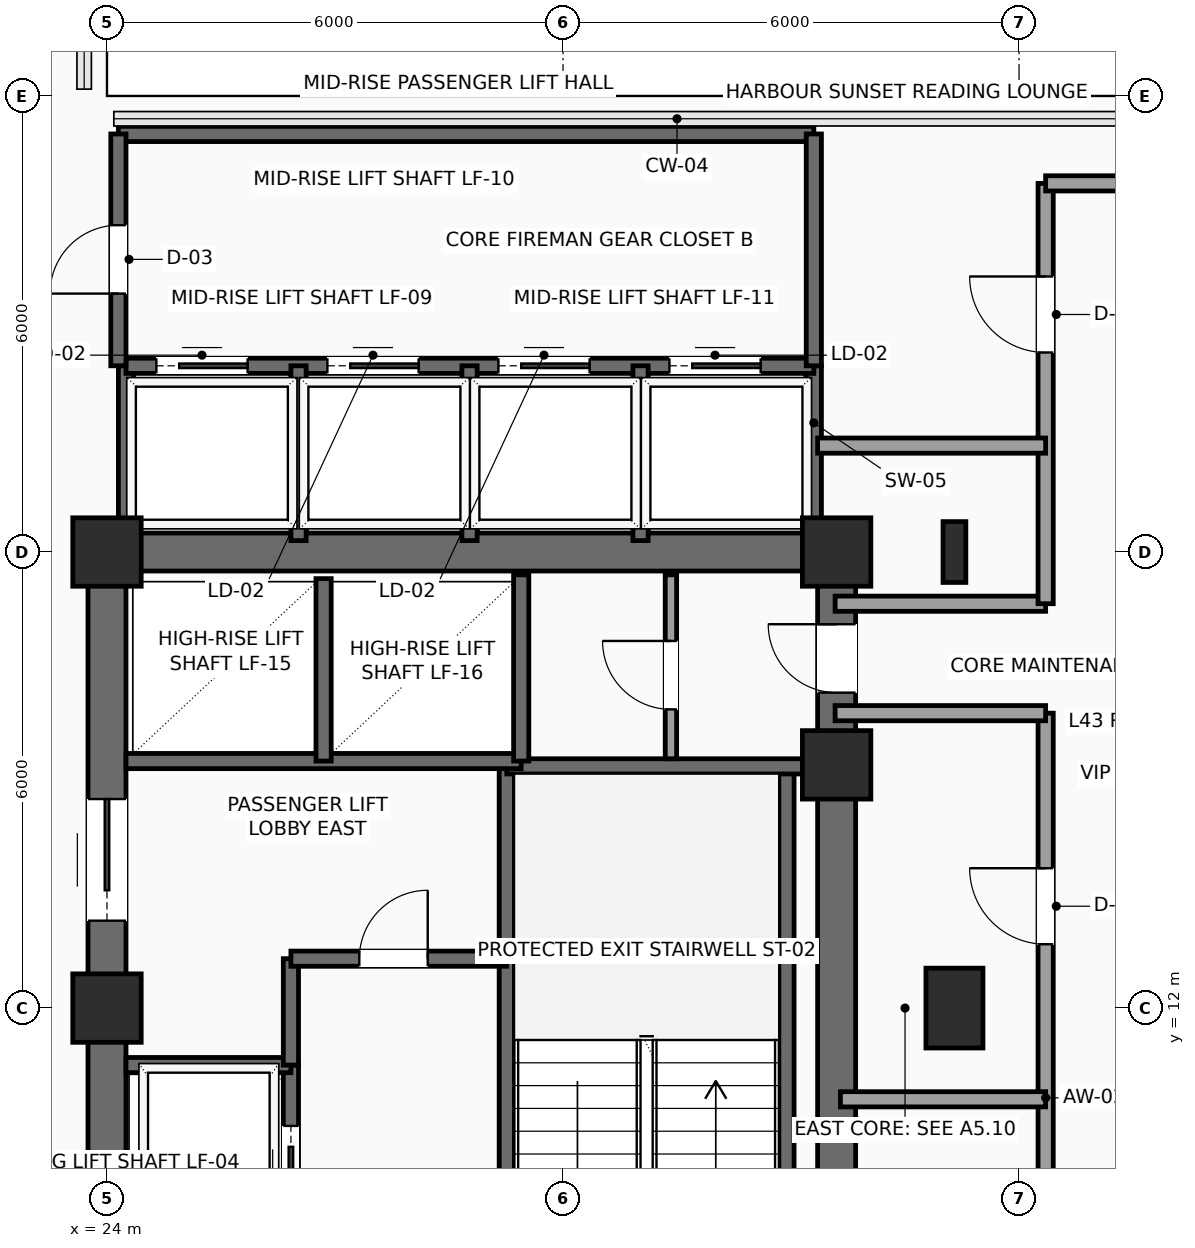
"""IFC4 building model, lengths in metres.
Left out: names, types, materials, properties, quantities, classifications, styles, units other than length and angle.
Written with IfcOpenShell. Run it as: python <this file> out.ifc"""

import sys

from ifc_helpers import new_model, si_unit, direction, frame, frame_2d, origin, origin_2d, place, context, subcontext, project, spatial, rectangle, i_section, extrude, element, fill, save


model = new_model("IFC4")
c1 = context("Model", 3, precision=1e-05, world=origin(), true_north=direction((0.0, 1.0)))
c2 = subcontext(c1, "Body", "Model", "MODEL_VIEW")
j1 = project(units=[si_unit("LENGTHUNIT", "METRE"), si_unit("PLANEANGLEUNIT", "RADIAN")], contexts=[c1])
p1 = place(None, origin())
s1 = spatial("IfcSite", under=j1, at=p1, CompositionType="ELEMENT")
p2 = place(p1, origin())
s2 = spatial("IfcBuilding", under=s1, at=p2, CompositionType="ELEMENT")
p3 = place(p2, frame((0.0, 0.0, 176.7)))
s3 = spatial("IfcBuildingStorey", under=s2, at=p3, CompositionType="ELEMENT", Elevation=176.7)
for number, where, z_axis, x_axis in (
    (1, (24.0, 12.0, 0.0), (0.0, 0.0, 1.0), (1.0, 0.0, 0.0)),
    (2, (24.0, 18.0, 0.0), (0.0, 0.0, 1.0), (1.0, 0.0, 0.0)),
    (3, (33.6, 15.2, 0.0), (0.0, 0.0, 1.0), (1.0, 0.0, 0.0)),
    (4, (33.6, 18.0, 0.0), (0.0, 0.0, 1.0), (1.0, 0.0, 0.0)),
):
    element("IfcColumn", number, at=place(p3, frame(where, z_axis=z_axis, x_axis=x_axis)), inside=s3, PredefinedType="COLUMN", context=c2, shape_type="SweptSolid", body=[
        extrude(rectangle(XDim=0.9, YDim=0.9, at=origin_2d()), origin(), (0.0, 0.0, 1.0), 3.75),
    ])
p4 = place(p3, frame((35.15, 12.0, 0.0), z_axis=(0.0, 0.0, 1.0), x_axis=(1.0, 0.0, 0.0)))
e5 = element("IfcColumn", 5, at=p4, inside=s3, PredefinedType="COLUMN", context=c2, shape_type="SweptSolid", body=[
    extrude(rectangle(XDim=0.75, YDim=1.05, at=origin_2d()), origin(), (0.0, 0.0, 1.0), 3.75),
])
p5 = place(p3, frame((35.15, 18.0, 0.0), z_axis=(0.0, 0.0, 1.0), x_axis=(1.0, 0.0, 0.0)))
e6 = element("IfcColumn", 6, at=p5, inside=s3, PredefinedType="COLUMN", context=c2, shape_type="SweptSolid", body=[
    extrude(i_section(OverallWidth=0.3, OverallDepth=0.8, WebThickness=0.018, FlangeThickness=0.033, FilletRadius=0.03, at=origin_2d()), origin(), (0.0, 0.0, 1.0), 3.75),
])
p6 = place(p3, frame((24.0, 18.0, 0.0), z_axis=(0.0, 0.0, 1.0), x_axis=(1.0, 0.0, 0.0)))
e7 = element("IfcWall", 7, at=p6, inside=s3, PredefinedType="SHEAR", context=c2, shape_type="SweptSolid", body=[
    extrude(rectangle(XDim=9.6, YDim=0.5, at=frame_2d((4.8, 0.0))), origin(), (0.0, 0.0, 1.0), 3.54),
])
p7 = place(p3, frame((24.0, 6.0, 0.0), z_axis=(0.0, 0.0, 1.0), x_axis=(0.0, 1.0, 0.0)))
e8 = element("IfcWall", 8, at=p7, inside=s3, PredefinedType="SHEAR", context=c2, shape_type="SweptSolid", body=[
    extrude(rectangle(XDim=12.0, YDim=0.5, at=frame_2d((6.0, 0.0))), origin(), (0.0, 0.0, 1.0), 3.54),
])
p8 = place(p7, frame((7.15, 0.0, 0.0)))
e9 = element("IfcOpeningElement", 9, at=p8, cuts=e8, PredefinedType="OPENING", context=c2, shape_type="SweptSolid", body=[
    extrude(rectangle(XDim=1.6, YDim=2.3, at=frame_2d((0.8, 1.15))), frame((0.0, 0.26, 0.0), z_axis=(0.0, -1.0, 0.0), x_axis=(1.0, 0.0, 0.0)), (0.0, 0.0, 1.0), 0.52),
])
p9 = place(p3, frame((33.6, 6.0, 0.0), z_axis=(0.0, 0.0, 1.0), x_axis=(0.0, 1.0, 0.0)))
e10 = element("IfcWall", 10, at=p9, inside=s3, PredefinedType="SHEAR", context=c2, shape_type="SweptSolid", body=[
    extrude(rectangle(XDim=12.0, YDim=0.5, at=frame_2d((6.0, 0.0))), origin(), (0.0, 0.0, 1.0), 3.54),
])
p10 = place(p9, frame((10.15, 0.0, 0.0)))
e11 = element("IfcOpeningElement", 11, at=p10, cuts=e10, PredefinedType="OPENING", context=c2, shape_type="SweptSolid", body=[
    extrude(rectangle(XDim=0.9, YDim=2.15, at=frame_2d((0.45, 1.075))), frame((0.0, 0.26, 0.0), z_axis=(0.0, -1.0, 0.0), x_axis=(1.0, 0.0, 0.0)), (0.0, 0.0, 1.0), 0.52),
])
p11 = place(p3, frame((29.26, 6.3, 0.0), z_axis=(0.0, 0.0, 1.0), x_axis=(0.0, 1.0, 0.0)))
e12 = element("IfcWall", 12, at=p11, inside=s3, PredefinedType="SHEAR", context=c2, shape_type="SweptSolid", body=[
    extrude(rectangle(XDim=8.88, YDim=0.2, at=frame_2d((4.44, 0.0))), origin(), (0.0, 0.0, 1.0), 3.54),
])
p12 = place(p11, frame((0.35, 0.0, 0.0)))
e13 = element("IfcOpeningElement", 13, at=p12, cuts=e12, PredefinedType="OPENING", context=c2, shape_type="SweptSolid", body=[
    extrude(rectangle(XDim=1.1, YDim=2.2, at=frame_2d((0.55, 1.1))), frame((0.0, 0.11, 0.0), z_axis=(0.0, -1.0, 0.0), x_axis=(1.0, 0.0, 0.0)), (0.0, 0.0, 1.0), 0.22),
])
p13 = place(p3, frame((32.94, 6.3, 0.0), z_axis=(0.0, 0.0, 1.0), x_axis=(0.0, 1.0, 0.0)))
e14 = element("IfcWall", 14, at=p13, inside=s3, PredefinedType="SHEAR", context=c2, shape_type="SweptSolid", body=[
    extrude(rectangle(XDim=8.88, YDim=0.2, at=frame_2d((4.44, 0.0))), origin(), (0.0, 0.0, 1.0), 3.54),
])
p14 = place(p3, frame((29.26, 15.18, 0.0), z_axis=(0.0, 0.0, 1.0), x_axis=(1.0, 0.0, 0.0)))
e15 = element("IfcWall", 15, at=p14, inside=s3, PredefinedType="SHEAR", context=c2, shape_type="SweptSolid", body=[
    extrude(rectangle(XDim=4.04, YDim=0.2, at=frame_2d((2.02, 0.0))), origin(), (0.0, 0.0, 1.0), 3.54),
])
p15 = place(p3, frame((26.42, 6.3, 0.0), z_axis=(0.0, 0.0, 1.0), x_axis=(0.0, 1.0, 0.0)))
e16 = element("IfcWall", 16, at=p15, inside=s3, PredefinedType="SHEAR", context=c2, shape_type="SweptSolid", body=[
    extrude(rectangle(XDim=4.95, YDim=0.2, at=frame_2d((2.475, 0.0))), origin(), (0.0, 0.0, 1.0), 3.54),
])
p16 = place(p15, frame((0.65, 0.0, 0.0)))
e17 = element("IfcOpeningElement", 17, at=p16, cuts=e16, PredefinedType="OPENING", context=c2, shape_type="SweptSolid", body=[
    extrude(rectangle(XDim=1.1, YDim=2.2, at=frame_2d((0.55, 1.1))), frame((0.0, 0.11, 0.0), z_axis=(0.0, -1.0, 0.0), x_axis=(1.0, 0.0, 0.0)), (0.0, 0.0, 1.0), 0.22),
])
p17 = place(p15, frame((3.05, 0.0, 0.0)))
e18 = element("IfcOpeningElement", 18, at=p17, cuts=e16, PredefinedType="OPENING", context=c2, shape_type="SweptSolid", body=[
    extrude(rectangle(XDim=1.1, YDim=2.2, at=frame_2d((0.55, 1.1))), frame((0.0, 0.11, 0.0), z_axis=(0.0, -1.0, 0.0), x_axis=(1.0, 0.0, 0.0)), (0.0, 0.0, 1.0), 0.22),
])
p18 = place(p3, frame((24.25, 11.25, 0.0), z_axis=(0.0, 0.0, 1.0), x_axis=(1.0, 0.0, 0.0)))
e19 = element("IfcWall", 19, at=p18, inside=s3, PredefinedType="SHEAR", context=c2, shape_type="SweptSolid", body=[
    extrude(rectangle(XDim=2.17, YDim=0.2, at=frame_2d((1.085, 0.0))), origin(), (0.0, 0.0, 1.0), 3.54),
])
p19 = place(p3, frame((26.42, 11.25, 0.0), z_axis=(0.0, 0.0, 1.0), x_axis=(0.0, 1.0, 0.0)))
e20 = element("IfcWall", 20, at=p19, inside=s3, PredefinedType="SHEAR", context=c2, shape_type="SweptSolid", body=[
    extrude(rectangle(XDim=1.4, YDim=0.2, at=frame_2d((0.7, 0.0))), origin(), (0.0, 0.0, 1.0), 3.54),
])
p20 = place(p3, frame((26.42, 12.65, 0.0), z_axis=(0.0, 0.0, 1.0), x_axis=(1.0, 0.0, 0.0)))
e21 = element("IfcWall", 21, at=p20, inside=s3, PredefinedType="SHEAR", context=c2, shape_type="SweptSolid", body=[
    extrude(rectangle(XDim=2.84, YDim=0.2, at=frame_2d((1.42, 0.0))), origin(), (0.0, 0.0, 1.0), 3.54),
])
p21 = place(p20, frame((0.9, 0.0, 0.0)))
e22 = element("IfcOpeningElement", 22, at=p21, cuts=e21, PredefinedType="OPENING", context=c2, shape_type="SweptSolid", body=[
    extrude(rectangle(XDim=0.9, YDim=2.15, at=frame_2d((0.45, 1.075))), frame((0.0, 0.11, 0.0), z_axis=(0.0, -1.0, 0.0), x_axis=(1.0, 0.0, 0.0)), (0.0, 0.0, 1.0), 0.22),
])
p22 = place(p3, frame((24.25, 15.25, 0.0), z_axis=(0.0, 0.0, 1.0), x_axis=(1.0, 0.0, 0.0)))
e23 = element("IfcWall", 23, at=p22, inside=s3, PredefinedType="SHEAR", context=c2, shape_type="SweptSolid", body=[
    extrude(rectangle(XDim=5.2, YDim=0.2, at=frame_2d((2.6, 0.0))), origin(), (0.0, 0.0, 1.0), 3.54),
])
p23 = place(p3, frame((26.85, 15.25, 0.0), z_axis=(0.0, 0.0, 1.0), x_axis=(0.0, 1.0, 0.0)))
e24 = element("IfcWall", 24, at=p23, inside=s3, PredefinedType="SHEAR", context=c2, shape_type="SweptSolid", body=[
    extrude(rectangle(XDim=2.4, YDim=0.2, at=frame_2d((1.2, 0.0))), origin(), (0.0, 0.0, 1.0), 3.54),
])
p24 = place(p3, frame((29.45, 15.25, 0.0), z_axis=(0.0, 0.0, 1.0), x_axis=(0.0, 1.0, 0.0)))
e25 = element("IfcWall", 25, at=p24, inside=s3, PredefinedType="SHEAR", context=c2, shape_type="SweptSolid", body=[
    extrude(rectangle(XDim=2.45, YDim=0.2, at=frame_2d((1.225, 0.0))), origin(), (0.0, 0.0, 1.0), 3.54),
])
p25 = place(p3, frame((31.42, 15.28, 0.0), z_axis=(0.0, 0.0, 1.0), x_axis=(0.0, 1.0, 0.0)))
e26 = element("IfcWall", 26, at=p25, inside=s3, PredefinedType="PARTITIONING", context=c2, shape_type="SweptSolid", body=[
    extrude(rectangle(XDim=2.42, YDim=0.15, at=frame_2d((1.21, 0.0))), origin(), (0.0, 0.0, 1.0), 3.54),
])
p26 = place(p25, frame((0.65, 0.0, 0.0)))
e27 = element("IfcOpeningElement", 27, at=p26, cuts=e26, PredefinedType="OPENING", context=c2, shape_type="SweptSolid", body=[
    extrude(rectangle(XDim=0.9, YDim=2.15, at=frame_2d((0.45, 1.075))), frame((0.0, 0.085, 0.0), z_axis=(0.0, -1.0, 0.0), x_axis=(1.0, 0.0, 0.0)), (0.0, 0.0, 1.0), 0.17),
])
for number, where, z_axis, x_axis in (
    (28, (33.3, 18.1, 0.0), (0.0, 0.0, 1.0), (0.0, 1.0, 0.0)),
    (29, (24.25, 18.1, 0.0), (0.0, 0.0, 1.0), (0.0, 1.0, 0.0)),
):
    element("IfcWall", number, at=place(p3, frame(where, z_axis=z_axis, x_axis=x_axis)), inside=s3, PredefinedType="SHEAR", context=c2, shape_type="SweptSolid", body=[
        extrude(rectangle(XDim=2.35, YDim=0.2, at=frame_2d((1.175, 0.0))), origin(), (0.0, 0.0, 1.0), 3.54),
    ])
p27 = place(p3, frame((24.25, 20.45, 0.0), z_axis=(0.0, 0.0, 1.0), x_axis=(1.0, 0.0, 0.0)))
e30 = element("IfcWall", 30, at=p27, inside=s3, PredefinedType="SHEAR", context=c2, shape_type="SweptSolid", body=[
    extrude(rectangle(XDim=9.05, YDim=0.2, at=frame_2d((4.525, 0.0))), origin(), (0.0, 0.0, 1.0), 3.54),
])
p28 = place(p27, frame((0.4, 0.0, 0.0)))
e31 = element("IfcOpeningElement", 31, at=p28, cuts=e30, PredefinedType="OPENING", context=c2, shape_type="SweptSolid", body=[
    extrude(rectangle(XDim=1.2, YDim=2.2, at=frame_2d((0.6, 1.1))), frame((0.0, 0.11, 0.0), z_axis=(0.0, -1.0, 0.0), x_axis=(1.0, 0.0, 0.0)), (0.0, 0.0, 1.0), 0.22),
])
p29 = place(p27, frame((2.65, 0.0, 0.0)))
e32 = element("IfcOpeningElement", 32, at=p29, cuts=e30, PredefinedType="OPENING", context=c2, shape_type="SweptSolid", body=[
    extrude(rectangle(XDim=1.2, YDim=2.2, at=frame_2d((0.6, 1.1))), frame((0.0, 0.11, 0.0), z_axis=(0.0, -1.0, 0.0), x_axis=(1.0, 0.0, 0.0)), (0.0, 0.0, 1.0), 0.22),
])
p30 = place(p27, frame((4.9, 0.0, 0.0)))
e33 = element("IfcOpeningElement", 33, at=p30, cuts=e30, PredefinedType="OPENING", context=c2, shape_type="SweptSolid", body=[
    extrude(rectangle(XDim=1.2, YDim=2.2, at=frame_2d((0.6, 1.1))), frame((0.0, 0.11, 0.0), z_axis=(0.0, -1.0, 0.0), x_axis=(1.0, 0.0, 0.0)), (0.0, 0.0, 1.0), 0.22),
])
p31 = place(p27, frame((7.15, 0.0, 0.0)))
e34 = element("IfcOpeningElement", 34, at=p31, cuts=e30, PredefinedType="OPENING", context=c2, shape_type="SweptSolid", body=[
    extrude(rectangle(XDim=1.2, YDim=2.2, at=frame_2d((0.6, 1.1))), frame((0.0, 0.11, 0.0), z_axis=(0.0, -1.0, 0.0), x_axis=(1.0, 0.0, 0.0)), (0.0, 0.0, 1.0), 0.22),
])
for number, where, z_axis, x_axis in (
    (35, (26.52, 18.15, 0.0), (0.0, 0.0, 1.0), (0.0, 1.0, 0.0)),
    (36, (28.77, 18.15, 0.0), (0.0, 0.0, 1.0), (0.0, 1.0, 0.0)),
    (37, (31.02, 18.15, 0.0), (0.0, 0.0, 1.0), (0.0, 1.0, 0.0)),
):
    element("IfcWall", number, at=place(p3, frame(where, z_axis=z_axis, x_axis=x_axis)), inside=s3, PredefinedType="SHEAR", context=c2, shape_type="SweptSolid", body=[
        extrude(rectangle(XDim=2.3, YDim=0.2, at=frame_2d((1.15, 0.0))), origin(), (0.0, 0.0, 1.0), 3.54),
    ])
p32 = place(p3, frame((24.15, 23.5, 0.0), z_axis=(0.0, 0.0, 1.0), x_axis=(1.0, 0.0, 0.0)))
e38 = element("IfcWall", 38, at=p32, inside=s3, PredefinedType="SHEAR", context=c2, shape_type="SweptSolid", body=[
    extrude(rectangle(XDim=9.15, YDim=0.2, at=frame_2d((4.575, 0.0))), origin(), (0.0, 0.0, 1.0), 3.54),
])
p33 = place(p3, frame((33.3, 20.45, 0.0), z_axis=(0.0, 0.0, 1.0), x_axis=(0.0, 1.0, 0.0)))
e39 = element("IfcWall", 39, at=p33, inside=s3, PredefinedType="SHEAR", context=c2, shape_type="SweptSolid", body=[
    extrude(rectangle(XDim=3.05, YDim=0.2, at=frame_2d((1.525, 0.0))), origin(), (0.0, 0.0, 1.0), 3.54),
])
p34 = place(p3, frame((24.15, 20.45, 0.0), z_axis=(0.0, 0.0, 1.0), x_axis=(0.0, 1.0, 0.0)))
e40 = element("IfcWall", 40, at=p34, inside=s3, PredefinedType="SHEAR", context=c2, shape_type="SweptSolid", body=[
    extrude(rectangle(XDim=3.05, YDim=0.2, at=frame_2d((1.525, 0.0))), origin(), (0.0, 0.0, 1.0), 3.54),
])
p35 = place(p34, frame((0.95, 0.0, 0.0)))
e41 = element("IfcOpeningElement", 41, at=p35, cuts=e40, PredefinedType="OPENING", context=c2, shape_type="SweptSolid", body=[
    extrude(rectangle(XDim=0.9, YDim=2.15, at=frame_2d((0.45, 1.075))), frame((0.0, 0.11, 0.0), z_axis=(0.0, -1.0, 0.0), x_axis=(1.0, 0.0, 0.0)), (0.0, 0.0, 1.0), 0.22),
])
p36 = place(p3, frame((36.35, 5.8, 0.0), z_axis=(0.0, 0.0, 1.0), x_axis=(0.0, 1.0, 0.0)))
e42 = element("IfcWall", 42, at=p36, inside=s3, PredefinedType="PARTITIONING", context=c2, shape_type="SweptSolid", body=[
    extrude(rectangle(XDim=10.08, YDim=0.2, at=frame_2d((5.04, 0.0))), origin(), (0.0, 0.0, 1.0), 3.54),
])
p37 = place(p36, frame((2.0, 0.0, 0.0)))
e43 = element("IfcOpeningElement", 43, at=p37, cuts=e42, PredefinedType="OPENING", context=c2, shape_type="SweptSolid", body=[
    extrude(rectangle(XDim=1.0, YDim=2.2, at=frame_2d((0.5, 1.1))), frame((0.0, 0.11, 0.0), z_axis=(0.0, -1.0, 0.0), x_axis=(1.0, 0.0, 0.0)), (0.0, 0.0, 1.0), 0.22),
])
p38 = place(p36, frame((7.04, 0.0, 0.0)))
e44 = element("IfcOpeningElement", 44, at=p38, cuts=e42, PredefinedType="OPENING", context=c2, shape_type="SweptSolid", body=[
    extrude(rectangle(XDim=1.0, YDim=2.2, at=frame_2d((0.5, 1.1))), frame((0.0, 0.11, 0.0), z_axis=(0.0, -1.0, 0.0), x_axis=(1.0, 0.0, 0.0)), (0.0, 0.0, 1.0), 0.22),
])
for number, where, z_axis, x_axis in (
    (45, (36.35, 15.88, 0.0), (0.0, 0.0, 1.0), (-1.0, 0.0, 0.0)),
    (46, (33.58, 17.32, 0.0), (0.0, 0.0, 1.0), (1.0, 0.0, 0.0)),
):
    element("IfcWall", number, at=place(p3, frame(where, z_axis=z_axis, x_axis=x_axis)), inside=s3, PredefinedType="PARTITIONING", context=c2, shape_type="SweptSolid", body=[
        extrude(rectangle(XDim=2.77, YDim=0.2, at=frame_2d((1.385, 0.0))), origin(), (0.0, 0.0, 1.0), 3.54),
    ])
p39 = place(p3, frame((36.35, 17.32, 0.0), z_axis=(0.0, 0.0, 1.0), x_axis=(0.0, 1.0, 0.0)))
e47 = element("IfcWall", 47, at=p39, inside=s3, PredefinedType="PARTITIONING", context=c2, shape_type="SweptSolid", body=[
    extrude(rectangle(XDim=5.53, YDim=0.2, at=frame_2d((2.765, 0.0))), origin(), (0.0, 0.0, 1.0), 3.54),
])
p40 = place(p39, frame((3.305, 0.0, 0.0)))
e48 = element("IfcOpeningElement", 48, at=p40, cuts=e47, PredefinedType="OPENING", context=c2, shape_type="SweptSolid", body=[
    extrude(rectangle(XDim=1.0, YDim=2.2, at=frame_2d((0.5, 1.1))), frame((0.0, 0.11, 0.0), z_axis=(0.0, -1.0, 0.0), x_axis=(1.0, 0.0, 0.0)), (0.0, 0.0, 1.0), 0.22),
])
p41 = place(p3, frame((36.35, 22.85, 0.0), z_axis=(0.0, 0.0, 1.0), x_axis=(1.0, 0.0, 0.0)))
e49 = element("IfcWall", 49, at=p41, inside=s3, PredefinedType="PARTITIONING", context=c2, shape_type="SweptSolid", body=[
    extrude(rectangle(XDim=2.1, YDim=0.2, at=frame_2d((1.05, 0.0))), origin(), (0.0, 0.0, 1.0), 3.54),
])
p42 = place(p3, frame((33.65, 10.8, 0.0), z_axis=(0.0, 0.0, 1.0), x_axis=(1.0, 0.0, 0.0)))
e50 = element("IfcWall", 50, at=p42, inside=s3, PredefinedType="PARTITIONING", context=c2, shape_type="SweptSolid", body=[
    extrude(rectangle(XDim=2.7, YDim=0.2, at=frame_2d((1.35, 0.0))), origin(), (0.0, 0.0, 1.0), 3.54),
])
p43 = place(p3, frame((33.35, 19.4, 0.0), z_axis=(0.0, 0.0, 1.0), x_axis=(1.0, 0.0, 0.0)))
e51 = element("IfcWall", 51, at=p43, inside=s3, PredefinedType="PARTITIONING", context=c2, shape_type="SweptSolid", body=[
    extrude(rectangle(XDim=3.0, YDim=0.2, at=frame_2d((1.5, 0.0))), origin(), (0.0, 0.0, 1.0), 3.54),
])
p44 = place(p8, origin())
e52 = element("IfcDoor", 52, at=p44, inside=s3, OperationType="DOUBLE_DOOR_SLIDING", PredefinedType="DOOR", context=c2, shape_type="SweptSolid", body=[
    extrude(rectangle(XDim=1.6, YDim=2.3, at=frame_2d((0.8, 1.15))), frame((0.0, 0.025, 0.0), z_axis=(0.0, -1.0, 0.0), x_axis=(1.0, 0.0, 0.0)), (0.0, 0.0, 1.0), 0.05),
])
fill(e9, e52)
p45 = place(p10, origin())
e53 = element("IfcDoor", 53, at=p45, inside=s3, OperationType="SINGLE_SWING_RIGHT", PredefinedType="DOOR", context=c2, shape_type="SweptSolid", body=[
    extrude(rectangle(XDim=0.9, YDim=2.15, at=frame_2d((0.45, 1.075))), frame((0.0, 0.025, 0.0), z_axis=(0.0, -1.0, 0.0), x_axis=(1.0, 0.0, 0.0)), (0.0, 0.0, 1.0), 0.05),
])
fill(e11, e53)
p46 = place(p17, origin())
e54 = element("IfcDoor", 54, at=p46, inside=s3, OperationType="SLIDING_TO_LEFT", PredefinedType="DOOR", context=c2, shape_type="SweptSolid", body=[
    extrude(rectangle(XDim=1.1, YDim=2.2, at=frame_2d((0.55, 1.1))), frame((0.0, 0.025, 0.0), z_axis=(0.0, -1.0, 0.0), x_axis=(1.0, 0.0, 0.0)), (0.0, 0.0, 1.0), 0.05),
])
fill(e18, e54)
p47 = place(p21, origin())
e55 = element("IfcDoor", 55, at=p47, inside=s3, OperationType="SINGLE_SWING_RIGHT", PredefinedType="DOOR", context=c2, shape_type="SweptSolid", body=[
    extrude(rectangle(XDim=0.9, YDim=2.15, at=frame_2d((0.45, 1.075))), frame((0.0, 0.025, 0.0), z_axis=(0.0, -1.0, 0.0), x_axis=(1.0, 0.0, 0.0)), (0.0, 0.0, 1.0), 0.05),
])
fill(e22, e55)
p48 = place(p26, origin())
e56 = element("IfcDoor", 56, at=p48, inside=s3, OperationType="SINGLE_SWING_RIGHT", PredefinedType="DOOR", context=c2, shape_type="SweptSolid", body=[
    extrude(rectangle(XDim=0.9, YDim=2.15, at=frame_2d((0.45, 1.075))), frame((0.0, 0.025, 0.0), z_axis=(0.0, -1.0, 0.0), x_axis=(1.0, 0.0, 0.0)), (0.0, 0.0, 1.0), 0.05),
])
fill(e27, e56)
p49 = place(p28, origin())
e57 = element("IfcDoor", 57, at=p49, inside=s3, OperationType="SLIDING_TO_RIGHT", PredefinedType="DOOR", context=c2, shape_type="SweptSolid", body=[
    extrude(rectangle(XDim=1.2, YDim=2.2, at=frame_2d((0.6, 1.1))), frame((0.0, 0.025, 0.0), z_axis=(0.0, -1.0, 0.0), x_axis=(1.0, 0.0, 0.0)), (0.0, 0.0, 1.0), 0.05),
])
fill(e31, e57)
p50 = place(p29, origin())
e58 = element("IfcDoor", 58, at=p50, inside=s3, OperationType="SLIDING_TO_RIGHT", PredefinedType="DOOR", context=c2, shape_type="SweptSolid", body=[
    extrude(rectangle(XDim=1.2, YDim=2.2, at=frame_2d((0.6, 1.1))), frame((0.0, 0.025, 0.0), z_axis=(0.0, -1.0, 0.0), x_axis=(1.0, 0.0, 0.0)), (0.0, 0.0, 1.0), 0.05),
])
fill(e32, e58)
p51 = place(p30, origin())
e59 = element("IfcDoor", 59, at=p51, inside=s3, OperationType="SLIDING_TO_RIGHT", PredefinedType="DOOR", context=c2, shape_type="SweptSolid", body=[
    extrude(rectangle(XDim=1.2, YDim=2.2, at=frame_2d((0.6, 1.1))), frame((0.0, 0.025, 0.0), z_axis=(0.0, -1.0, 0.0), x_axis=(1.0, 0.0, 0.0)), (0.0, 0.0, 1.0), 0.05),
])
fill(e33, e59)
p52 = place(p31, origin())
e60 = element("IfcDoor", 60, at=p52, inside=s3, OperationType="SLIDING_TO_RIGHT", PredefinedType="DOOR", context=c2, shape_type="SweptSolid", body=[
    extrude(rectangle(XDim=1.2, YDim=2.2, at=frame_2d((0.6, 1.1))), frame((0.0, 0.025, 0.0), z_axis=(0.0, -1.0, 0.0), x_axis=(1.0, 0.0, 0.0)), (0.0, 0.0, 1.0), 0.05),
])
fill(e34, e60)
p53 = place(p35, origin())
e61 = element("IfcDoor", 61, at=p53, inside=s3, OperationType="SINGLE_SWING_LEFT", PredefinedType="DOOR", context=c2, shape_type="SweptSolid", body=[
    extrude(rectangle(XDim=0.9, YDim=2.15, at=frame_2d((0.45, 1.075))), frame((0.0, 0.025, 0.0), z_axis=(0.0, -1.0, 0.0), x_axis=(1.0, 0.0, 0.0)), (0.0, 0.0, 1.0), 0.05),
])
fill(e41, e61)
p54 = place(p38, origin())
e62 = element("IfcDoor", 62, at=p54, inside=s3, OperationType="SINGLE_SWING_RIGHT", PredefinedType="DOOR", context=c2, shape_type="SweptSolid", body=[
    extrude(rectangle(XDim=1.0, YDim=2.2, at=frame_2d((0.5, 1.1))), frame((0.0, 0.025, 0.0), z_axis=(0.0, -1.0, 0.0), x_axis=(1.0, 0.0, 0.0)), (0.0, 0.0, 1.0), 0.05),
])
fill(e44, e62)
p55 = place(p40, origin())
e63 = element("IfcDoor", 63, at=p55, inside=s3, OperationType="SINGLE_SWING_RIGHT", PredefinedType="DOOR", context=c2, shape_type="SweptSolid", body=[
    extrude(rectangle(XDim=1.0, YDim=2.2, at=frame_2d((0.5, 1.1))), frame((0.0, 0.025, 0.0), z_axis=(0.0, -1.0, 0.0), x_axis=(1.0, 0.0, 0.0)), (0.0, 0.0, 1.0), 0.05),
])
fill(e48, e63)
save(model, sys.argv[1])
